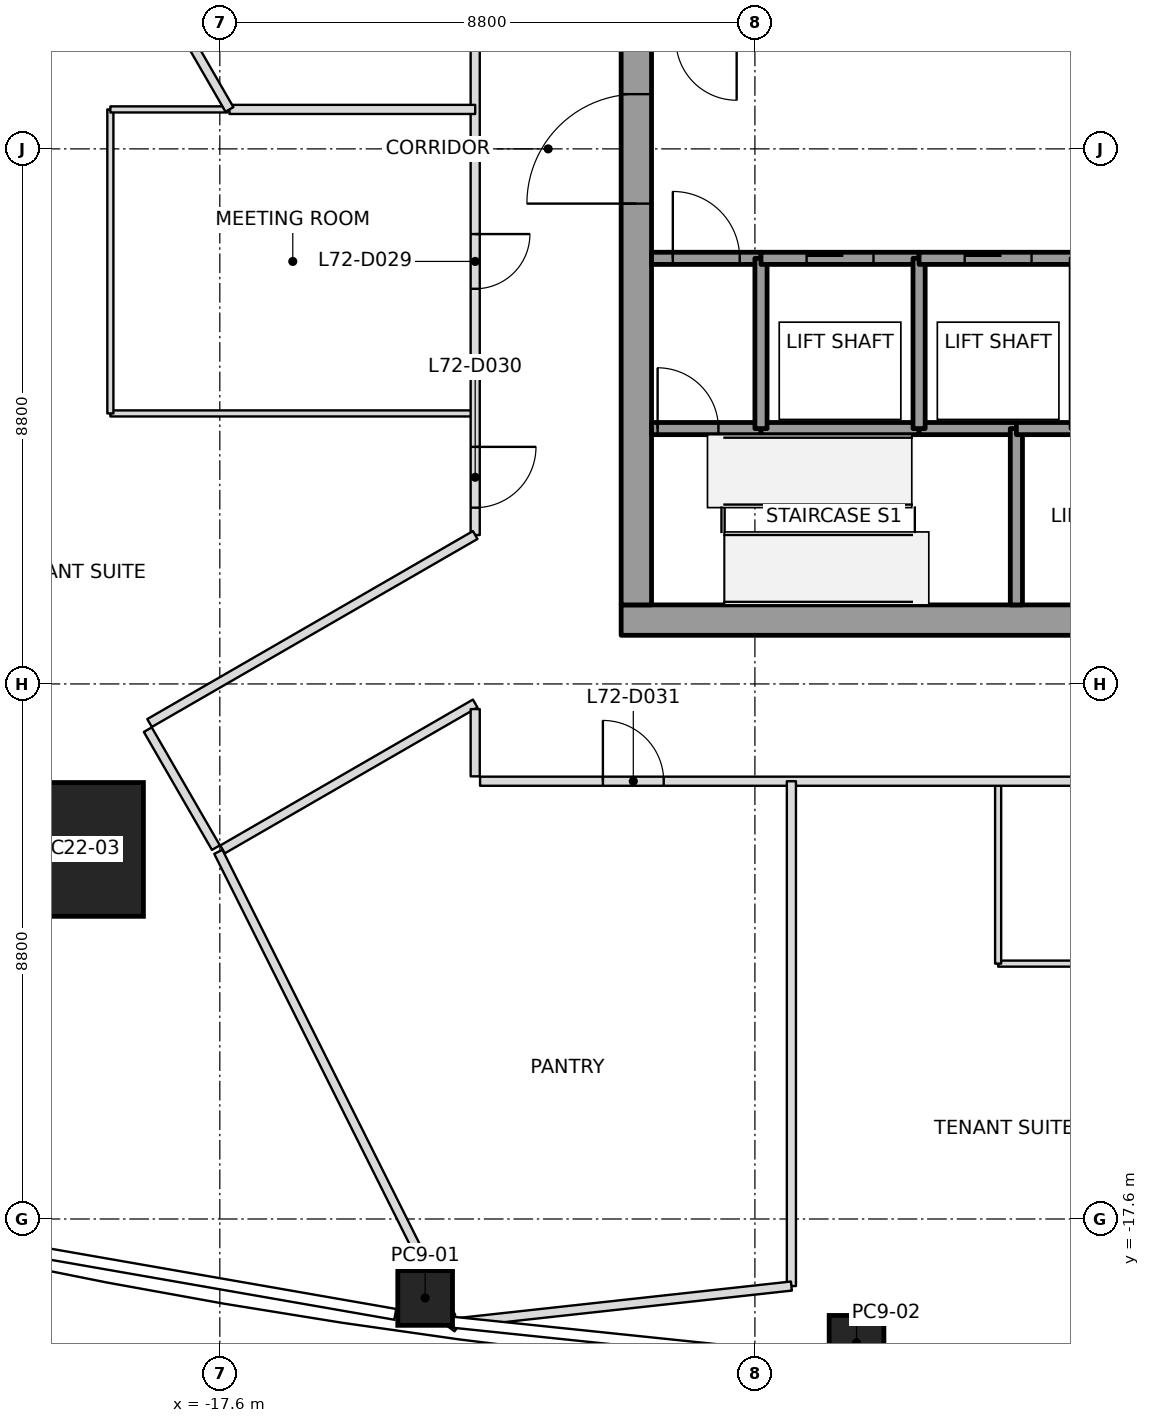
"""IFC4 building model, lengths in metres.
Left out: names, types, materials, properties, quantities, classifications, styles, units other than length and angle.
Written with IfcOpenShell. Run it as: python <this file> out.ifc"""

import sys

from ifc_helpers import new_model, si_unit, direction, frame, frame_2d, origin, origin_2d, place, context, subcontext, project, spatial, rectangle, extrude, clip, halfspace, element, fill, save


model = new_model("IFC4")
c1 = context("Model", 3, precision=1e-05, world=origin(), true_north=direction((0.0, 1.0)))
c2 = subcontext(c1, "Body", "Model", "MODEL_VIEW")
j1 = project(units=[si_unit("LENGTHUNIT", "METRE"), si_unit("PLANEANGLEUNIT", "RADIAN")], contexts=[c1])
p1 = place(None, origin())
s1 = spatial("IfcSite", under=j1, at=p1, CompositionType="ELEMENT")
p2 = place(p1, origin())
s2 = spatial("IfcBuilding", under=s1, at=p2, CompositionType="ELEMENT")
p3 = place(p2, frame((0.0, 0.0, 315.0)))
s3 = spatial("IfcBuildingStorey", under=s2, at=p3, CompositionType="ELEMENT", Elevation=315.0)
p4 = place(p3, frame((-19.957, -11.522, 0.0), z_axis=(0.027695790401, 0.015983033227, 0.999488612163), x_axis=(0.999616398022, -0.00044283261, -0.027692249912)))
e1 = element("IfcColumn", 1, at=p4, inside=s3, PredefinedType="COLUMN", context=c2, shape_type="SweptSolid", body=[
    clip(extrude(rectangle(XDim=2.2, YDim=2.2, at=origin_2d()), origin(), (0.0, 0.0, 1.0), 4.002), halfspace(frame((0.0, 0.0, 3.996)), False)),
])
p5 = place(p3, frame((-14.223, -18.899, 0.0), z_axis=(0.017391463473, 0.010312832726, 0.999795570344), x_axis=(-0.990322442734, 0.13788284729, 0.015804424743)))
e2 = element("IfcColumn", 2, at=p5, inside=s3, PredefinedType="COLUMN", context=c2, shape_type="SweptSolid", body=[
    clip(extrude(rectangle(XDim=0.9, YDim=0.9, at=origin_2d()), origin(), (0.0, 0.0, 1.0), 4.001), halfspace(frame((0.0, 0.0, 3.999)), False)),
])
p6 = place(p3, frame((-7.129, -19.637, 0.0), z_axis=(0.008727144629, 0.01122933295, 0.9998988644), x_axis=(-0.997577286368, 0.069113396853, 0.007930705989)))
e3 = element("IfcColumn", 3, at=p6, inside=s3, PredefinedType="COLUMN", context=c2, shape_type="SweptSolid", body=[
    clip(extrude(rectangle(XDim=0.9, YDim=0.9, at=origin_2d()), origin(), (0.0, 0.0, 1.0), 4.0), halfspace(frame((0.0, 0.0, 3.999)), False)),
])
p7 = place(p3, frame((-11.0, -7.75, 0.0), z_axis=(0.0, 0.0, 1.0), x_axis=(1.0, 0.0, 0.0)))
e4 = element("IfcWall", 4, at=p7, inside=s3, PredefinedType="SHEAR", context=c2, shape_type="SweptSolid", body=[
    extrude(rectangle(XDim=22.0, YDim=0.5, at=frame_2d((11.0, 0.0))), origin(), (0.0, 0.0, 1.0), 4.0),
])
p8 = place(p7, frame((10.45, 0.0, 0.0)))
e5 = element("IfcOpeningElement", 5, at=p8, cuts=e4, PredefinedType="OPENING", context=c2, shape_type="SweptSolid", body=[
    extrude(rectangle(XDim=1.1, YDim=2.1, at=frame_2d((0.55, 1.05))), frame((0.0, 0.25, 0.0), z_axis=(0.0, -1.0, 0.0), x_axis=(1.0, 0.0, 0.0)), (0.0, 0.0, 1.0), 0.5),
])
p9 = place(p3, frame((-10.75, -7.5, 0.0), z_axis=(0.0, 0.0, 1.0), x_axis=(0.0, 1.0, 0.0)))
e6 = element("IfcWall", 6, at=p9, inside=s3, PredefinedType="SHEAR", context=c2, shape_type="SweptSolid", body=[
    extrude(rectangle(XDim=15.0, YDim=0.5, at=frame_2d((7.5, 0.0))), origin(), (0.0, 0.0, 1.0), 4.0),
])
p10 = place(p9, frame((6.6, 0.0, 0.0)))
e7 = element("IfcOpeningElement", 7, at=p10, cuts=e6, PredefinedType="OPENING", context=c2, shape_type="SweptSolid", body=[
    extrude(rectangle(XDim=1.8, YDim=2.1, at=frame_2d((0.9, 1.05))), frame((0.0, 0.25, 0.0), z_axis=(0.0, -1.0, 0.0), x_axis=(1.0, 0.0, 0.0)), (0.0, 0.0, 1.0), 0.5),
])
p11 = place(p3, frame((-10.5, -4.6, 0.0), z_axis=(0.0, 0.0, 1.0), x_axis=(1.0, 0.0, 0.0)))
e8 = element("IfcWall", 8, at=p11, inside=s3, PredefinedType="SOLIDWALL", context=c2, shape_type="SweptSolid", body=[
    extrude(rectangle(XDim=1.8, YDim=0.2, at=frame_2d((0.9, 0.0))), origin(), (0.0, 0.0, 1.0), 3.85),
])
p12 = place(p11, frame((0.1, 0.0, 0.0)))
e9 = element("IfcOpeningElement", 9, at=p12, cuts=e8, PredefinedType="OPENING", context=c2, shape_type="SweptSolid", body=[
    extrude(rectangle(XDim=1.0, YDim=2.1, at=frame_2d((0.5, 1.05))), frame((0.0, 0.1, 0.0), z_axis=(0.0, -1.0, 0.0), x_axis=(1.0, 0.0, 0.0)), (0.0, 0.0, 1.0), 0.2),
])
p13 = place(p3, frame((-10.5, -1.8, 0.0), z_axis=(0.0, 0.0, 1.0), x_axis=(1.0, 0.0, 0.0)))
e10 = element("IfcWall", 10, at=p13, inside=s3, PredefinedType="SOLIDWALL", context=c2, shape_type="SweptSolid", body=[
    extrude(rectangle(XDim=1.8, YDim=0.2, at=frame_2d((0.9, 0.0))), origin(), (0.0, 0.0, 1.0), 3.85),
])
p14 = place(p13, frame((0.35, 0.0, 0.0)))
e11 = element("IfcOpeningElement", 11, at=p14, cuts=e10, PredefinedType="OPENING", context=c2, shape_type="SweptSolid", body=[
    extrude(rectangle(XDim=1.1, YDim=2.1, at=frame_2d((0.55, 1.05))), frame((0.0, 0.1, 0.0), z_axis=(0.0, -1.0, 0.0), x_axis=(1.0, 0.0, 0.0)), (0.0, 0.0, 1.0), 0.2),
])
p15 = place(p3, frame((-8.7, -4.6, 0.0), z_axis=(0.0, 0.0, 1.0), x_axis=(1.0, 0.0, 0.0)))
e12 = element("IfcWall", 12, at=p15, inside=s3, PredefinedType="SOLIDWALL", context=c2, shape_type="SweptSolid", body=[
    extrude(rectangle(XDim=2.6, YDim=0.2, at=frame_2d((1.3, 0.0))), origin(), (0.0, 0.0, 1.0), 3.85),
])
p16 = place(p3, frame((-8.7, -4.6, 0.0), z_axis=(0.0, 0.0, 1.0), x_axis=(0.0, 1.0, 0.0)))
e13 = element("IfcWall", 13, at=p16, inside=s3, PredefinedType="SOLIDWALL", context=c2, shape_type="SweptSolid", body=[
    extrude(rectangle(XDim=2.8, YDim=0.2, at=frame_2d((1.4, 0.0))), origin(), (0.0, 0.0, 1.0), 3.85),
])
p17 = place(p3, frame((-8.7, -1.8, 0.0), z_axis=(0.0, 0.0, 1.0), x_axis=(1.0, 0.0, 0.0)))
e14 = element("IfcWall", 14, at=p17, inside=s3, PredefinedType="SOLIDWALL", context=c2, shape_type="SweptSolid", body=[
    extrude(rectangle(XDim=2.6, YDim=0.2, at=frame_2d((1.3, 0.0))), origin(), (0.0, 0.0, 1.0), 3.85),
])
p18 = place(p17, frame((0.75, 0.0, 0.0)))
e15 = element("IfcOpeningElement", 15, at=p18, cuts=e14, PredefinedType="OPENING", context=c2, shape_type="SweptSolid", body=[
    extrude(rectangle(XDim=1.1, YDim=2.1, at=frame_2d((0.55, 1.05))), frame((0.0, 0.1, 0.0), z_axis=(0.0, -1.0, 0.0), x_axis=(1.0, 0.0, 0.0)), (0.0, 0.0, 1.0), 0.2),
])
p19 = place(p3, frame((-6.1, -4.6, 0.0), z_axis=(0.0, 0.0, 1.0), x_axis=(1.0, 0.0, 0.0)))
e16 = element("IfcWall", 16, at=p19, inside=s3, PredefinedType="SOLIDWALL", context=c2, shape_type="SweptSolid", body=[
    extrude(rectangle(XDim=1.6, YDim=0.2, at=frame_2d((0.8, 0.0))), origin(), (0.0, 0.0, 1.0), 3.85),
])
p20 = place(p3, frame((-6.1, -4.6, 0.0), z_axis=(0.0, 0.0, 1.0), x_axis=(0.0, 1.0, 0.0)))
e17 = element("IfcWall", 17, at=p20, inside=s3, PredefinedType="SOLIDWALL", context=c2, shape_type="SweptSolid", body=[
    extrude(rectangle(XDim=2.8, YDim=0.2, at=frame_2d((1.4, 0.0))), origin(), (0.0, 0.0, 1.0), 3.85),
])
p21 = place(p3, frame((-6.1, -1.8, 0.0), z_axis=(0.0, 0.0, 1.0), x_axis=(1.0, 0.0, 0.0)))
e18 = element("IfcWall", 18, at=p21, inside=s3, PredefinedType="SOLIDWALL", context=c2, shape_type="SweptSolid", body=[
    extrude(rectangle(XDim=2.6, YDim=0.2, at=frame_2d((1.3, 0.0))), origin(), (0.0, 0.0, 1.0), 3.85),
])
p22 = place(p21, frame((0.75, 0.0, 0.0)))
e19 = element("IfcOpeningElement", 19, at=p22, cuts=e18, PredefinedType="OPENING", context=c2, shape_type="SweptSolid", body=[
    extrude(rectangle(XDim=1.1, YDim=2.1, at=frame_2d((0.55, 1.05))), frame((0.0, 0.1, 0.0), z_axis=(0.0, -1.0, 0.0), x_axis=(1.0, 0.0, 0.0)), (0.0, 0.0, 1.0), 0.2),
])
p23 = place(p3, frame((-4.5, -4.6, 0.0), z_axis=(0.0, 0.0, 1.0), x_axis=(0.0, -1.0, 0.0)))
e20 = element("IfcWall", 20, at=p23, inside=s3, PredefinedType="SOLIDWALL", context=c2, shape_type="SweptSolid", body=[
    extrude(rectangle(XDim=2.9, YDim=0.2, at=frame_2d((1.45, 0.0))), origin(), (0.0, 0.0, 1.0), 3.85),
])
p24 = place(p3, frame((-4.5, -4.6, 0.0), z_axis=(0.0, 0.0, 1.0), x_axis=(1.0, 0.0, 0.0)))
e21 = element("IfcWall", 21, at=p24, inside=s3, PredefinedType="SOLIDWALL", context=c2, shape_type="SweptSolid", body=[
    extrude(rectangle(XDim=1.0, YDim=0.2, at=frame_2d((0.5, 0.0))), origin(), (0.0, 0.0, 1.0), 3.85),
])
p25 = place(p3, frame((-13.4, 0.649, 0.0), z_axis=(0.0, 0.0, 1.0), x_axis=(-1.0, 0.0, 0.0)))
e22 = element("IfcWall", 22, at=p25, inside=s3, PredefinedType="PARTITIONING", context=c2, shape_type="SweptSolid", body=[
    extrude(rectangle(XDim=4.042, YDim=0.15, at=frame_2d((2.021, 0.0))), origin(), (0.0, 0.0, 1.0), 3.45),
])
p26 = place(p3, frame((-17.441, 0.649, 0.0), z_axis=(0.0, 0.0, 1.0), x_axis=(-0.499998843543, 0.866026071464, 0.0)))
e23 = element("IfcWall", 23, at=p26, inside=s3, PredefinedType="PARTITIONING", context=c2, shape_type="SweptSolid", body=[
    extrude(rectangle(XDim=5.531, YDim=0.15, at=frame_2d((2.765, 0.0))), origin(), (0.0, 0.0, 1.0), 3.234),
])
p27 = place(p3, frame((-17.625, -11.561, 0.0), z_axis=(0.0, 0.0, 1.0), x_axis=(0.447464657965, -0.894301615716, 0.0)))
e24 = element("IfcWall", 24, at=p27, inside=s3, PredefinedType="PARTITIONING", context=c2, shape_type="SweptSolid", body=[
    extrude(rectangle(XDim=8.557, YDim=0.15, at=frame_2d((4.278, 0.0))), origin(), (0.0, 0.0, 1.0), 3.45),
])
p28 = place(p3, frame((-8.2, -10.4, 0.0), z_axis=(0.0, 0.0, 1.0), x_axis=(0.0, -1.0, 0.0)))
e25 = element("IfcWall", 25, at=p28, inside=s3, PredefinedType="PARTITIONING", context=c2, shape_type="SweptSolid", body=[
    extrude(rectangle(XDim=8.303, YDim=0.15, at=frame_2d((4.151, 0.0))), origin(), (0.0, 0.0, 1.0), 3.45),
])
p29 = place(p3, frame((-8.2, -18.703, 0.0), z_axis=(0.0, 0.0, 1.0), x_axis=(-0.994036039738, -0.109052059594, 0.0)))
e26 = element("IfcWall", 26, at=p29, inside=s3, PredefinedType="PARTITIONING", context=c2, shape_type="SweptSolid", body=[
    extrude(rectangle(XDim=5.478, YDim=0.15, at=frame_2d((2.739, 0.0))), origin(), (0.0, 0.0, 1.0), 3.234),
])
p30 = place(p3, frame((-13.696, -19.387, 0.0), z_axis=(0.0, 0.0, 1.0), x_axis=(-0.806193122495, 0.591652473368, 0.0)))
e27 = element("IfcWall", 27, at=p30, inside=s3, PredefinedType="PARTITIONING", context=c2, shape_type="SweptSolid", body=[
    extrude(rectangle(XDim=0.183, YDim=0.15, at=frame_2d((0.092, 0.0))), origin(), (0.0, 0.0, 1.0), 3.45),
])
p31 = place(p3, frame((-18.784, -9.552, 0.0), z_axis=(0.0, 0.0, 1.0), x_axis=(0.49994888933, -0.866054910533, 0.0)))
e28 = element("IfcWall", 28, at=p31, inside=s3, PredefinedType="PARTITIONING", context=c2, shape_type="SweptSolid", body=[
    extrude(rectangle(XDim=2.24, YDim=0.15, at=frame_2d((1.12, 0.0))), origin(), (0.0, 0.0, 1.0), 3.233),
])
p32 = place(p3, frame((-13.4, 6.351, 0.0), z_axis=(0.0, 0.0, 1.0), x_axis=(0.0, -1.0, 0.0)))
e29 = element("IfcWall", 29, at=p32, inside=s3, PredefinedType="PARTITIONING", context=c2, shape_type="SweptSolid", body=[
    extrude(rectangle(XDim=12.702, YDim=0.15, at=frame_2d((6.351, 0.0))), origin(), (0.0, 0.0, 1.0), 3.317),
])
p33 = place(p32, frame((2.351, 0.0, 0.0)))
e30 = element("IfcOpeningElement", 30, at=p33, cuts=e29, PredefinedType="OPENING", context=c2, shape_type="SweptSolid", body=[
    extrude(rectangle(XDim=1.0, YDim=2.1, at=frame_2d((0.5, 1.05))), frame((0.0, 0.075, 0.0), z_axis=(0.0, -1.0, 0.0), x_axis=(1.0, 0.0, 0.0)), (0.0, 0.0, 1.0), 0.15),
])
p34 = place(p32, frame((7.752, 0.0, 0.0)))
e31 = element("IfcOpeningElement", 31, at=p34, cuts=e29, PredefinedType="OPENING", context=c2, shape_type="SweptSolid", body=[
    extrude(rectangle(XDim=0.9, YDim=2.1, at=frame_2d((0.45, 1.05))), frame((0.0, 0.075, 0.0), z_axis=(0.0, -1.0, 0.0), x_axis=(1.0, 0.0, 0.0)), (0.0, 0.0, 1.0), 0.15),
])
p35 = place(p32, frame((11.252, 0.0, 0.0)))
e32 = element("IfcOpeningElement", 32, at=p35, cuts=e29, PredefinedType="OPENING", context=c2, shape_type="SweptSolid", body=[
    extrude(rectangle(XDim=1.0, YDim=2.1, at=frame_2d((0.5, 1.05))), frame((0.0, 0.075, 0.0), z_axis=(0.0, -1.0, 0.0), x_axis=(1.0, 0.0, 0.0)), (0.0, 0.0, 1.0), 0.15),
])
p36 = place(p3, frame((-13.4, -6.351, 0.0), z_axis=(0.0, 0.0, 1.0), x_axis=(-0.866038319186, -0.499977629202, 0.0)))
e33 = element("IfcWall", 33, at=p36, inside=s3, PredefinedType="PARTITIONING", context=c2, shape_type="SweptSolid", body=[
    extrude(rectangle(XDim=6.184, YDim=0.15, at=frame_2d((3.092, 0.0))), origin(), (0.0, 0.0, 1.0), 3.317),
])
p37 = place(p3, frame((-17.555, -11.521, 0.0), z_axis=(0.0, 0.0, 1.0), x_axis=(0.866027142779, 0.499996987961, 0.0)))
e34 = element("IfcWall", 34, at=p37, inside=s3, PredefinedType="PARTITIONING", context=c2, shape_type="SweptSolid", body=[
    extrude(rectangle(XDim=4.798, YDim=0.15, at=frame_2d((2.399, 0.0))), origin(), (0.0, 0.0, 1.0), 3.233),
])
p38 = place(p3, frame((-13.4, -9.214, 0.0), z_axis=(0.0, 0.0, 1.0), x_axis=(0.0, -1.0, 0.0)))
e35 = element("IfcWall", 35, at=p38, inside=s3, PredefinedType="PARTITIONING", context=c2, shape_type="SweptSolid", body=[
    extrude(rectangle(XDim=1.106, YDim=0.15, at=frame_2d((0.553, 0.0))), origin(), (0.0, 0.0, 1.0), 3.233),
])
p39 = place(p3, frame((-13.32, -10.4, 0.0), z_axis=(0.0, 0.0, 1.0), x_axis=(1.0, 0.0, 0.0)))
e36 = element("IfcWall", 36, at=p39, inside=s3, PredefinedType="PARTITIONING", context=c2, shape_type="SweptSolid", body=[
    extrude(rectangle(XDim=12.12, YDim=0.15, at=frame_2d((6.06, 0.0))), origin(), (0.0, 0.0, 1.0), 3.393),
])
p40 = place(p39, frame((2.02, 0.0, 0.0)))
e37 = element("IfcOpeningElement", 37, at=p40, cuts=e36, PredefinedType="OPENING", context=c2, shape_type="SweptSolid", body=[
    extrude(rectangle(XDim=1.0, YDim=2.1, at=frame_2d((0.5, 1.05))), frame((0.0, 0.075, 0.0), z_axis=(0.0, -1.0, 0.0), x_axis=(1.0, 0.0, 0.0)), (0.0, 0.0, 1.0), 0.15),
])
p41 = place(p3, frame((-13.43, -4.351, 0.0), z_axis=(0.0, 0.0, 1.0), x_axis=(-1.0, 0.0, 0.0)))
e38 = element("IfcWall", 38, at=p41, inside=s3, PredefinedType="PARTITIONING", context=c2, shape_type="SweptSolid", body=[
    extrude(rectangle(XDim=5.97, YDim=0.1, at=frame_2d((2.985, 0.0))), origin(), (0.0, 0.0, 1.0), 3.317),
])
p42 = place(p3, frame((-19.4, -4.351, 0.0), z_axis=(0.0, 0.0, 1.0), x_axis=(0.0, 1.0, 0.0)))
e39 = element("IfcWall", 39, at=p42, inside=s3, PredefinedType="PARTITIONING", context=c2, shape_type="SweptSolid", body=[
    extrude(rectangle(XDim=5.0, YDim=0.1, at=frame_2d((2.5, 0.0))), origin(), (0.0, 0.0, 1.0), 3.317),
])
p43 = place(p3, frame((-19.4, 0.649, 0.0), z_axis=(0.0, 0.0, 1.0), x_axis=(1.0, 0.0, 0.0)))
e40 = element("IfcWall", 40, at=p43, inside=s3, PredefinedType="PARTITIONING", context=c2, shape_type="SweptSolid", body=[
    extrude(rectangle(XDim=1.924, YDim=0.1, at=frame_2d((0.962, 0.0))), origin(), (0.0, 0.0, 1.0), 3.393),
])
p44 = place(p3, frame((-1.23, -13.4, 0.0), z_axis=(0.0, 0.0, 1.0), x_axis=(-1.0, 0.0, 0.0)))
e41 = element("IfcWall", 41, at=p44, inside=s3, PredefinedType="PARTITIONING", context=c2, shape_type="SweptSolid", body=[
    extrude(rectangle(XDim=3.57, YDim=0.1, at=frame_2d((1.785, 0.0))), origin(), (0.0, 0.0, 1.0), 3.393),
])
p45 = place(p3, frame((-4.8, -13.4, 0.0), z_axis=(0.0, 0.0, 1.0), x_axis=(0.0, 1.0, 0.0)))
e42 = element("IfcWall", 42, at=p45, inside=s3, PredefinedType="PARTITIONING", context=c2, shape_type="SweptSolid", body=[
    extrude(rectangle(XDim=2.97, YDim=0.1, at=frame_2d((1.485, 0.0))), origin(), (0.0, 0.0, 1.0), 3.45),
])
p46 = place(p34, origin())
e43 = element("IfcDoor", 43, at=p46, inside=s3, OperationType="SINGLE_SWING_RIGHT", PredefinedType="DOOR", context=c2, shape_type="SweptSolid", body=[
    extrude(rectangle(XDim=0.9, YDim=2.1, at=frame_2d((0.45, 1.05))), frame((0.0, 0.025, 0.0), z_axis=(0.0, -1.0, 0.0), x_axis=(1.0, 0.0, 0.0)), (0.0, 0.0, 1.0), 0.05),
])
fill(e31, e43)
p47 = place(p35, origin())
e44 = element("IfcDoor", 44, at=p47, inside=s3, OperationType="SINGLE_SWING_RIGHT", PredefinedType="DOOR", context=c2, shape_type="SweptSolid", body=[
    extrude(rectangle(XDim=1.0, YDim=2.1, at=frame_2d((0.5, 1.05))), frame((0.0, 0.025, 0.0), z_axis=(0.0, -1.0, 0.0), x_axis=(1.0, 0.0, 0.0)), (0.0, 0.0, 1.0), 0.05),
])
fill(e32, e44)
p48 = place(p40, origin())
e45 = element("IfcDoor", 45, at=p48, inside=s3, OperationType="SINGLE_SWING_LEFT", PredefinedType="DOOR", context=c2, shape_type="SweptSolid", body=[
    extrude(rectangle(XDim=1.0, YDim=2.1, at=frame_2d((0.5, 1.05))), frame((0.0, 0.025, 0.0), z_axis=(0.0, -1.0, 0.0), x_axis=(1.0, 0.0, 0.0)), (0.0, 0.0, 1.0), 0.05),
])
fill(e37, e45)
p49 = place(p18, origin())
e46 = element("IfcDoor", 46, at=p49, inside=s3, OperationType="SLIDING_TO_RIGHT", PredefinedType="DOOR", context=c2, shape_type="SweptSolid", body=[
    extrude(rectangle(XDim=1.1, YDim=2.1, at=frame_2d((0.55, 1.05))), frame((0.0, 0.025, 0.0), z_axis=(0.0, -1.0, 0.0), x_axis=(1.0, 0.0, 0.0)), (0.0, 0.0, 1.0), 0.05),
])
fill(e15, e46)
p50 = place(p22, origin())
e47 = element("IfcDoor", 47, at=p50, inside=s3, OperationType="SLIDING_TO_RIGHT", PredefinedType="DOOR", context=c2, shape_type="SweptSolid", body=[
    extrude(rectangle(XDim=1.1, YDim=2.1, at=frame_2d((0.55, 1.05))), frame((0.0, 0.025, 0.0), z_axis=(0.0, -1.0, 0.0), x_axis=(1.0, 0.0, 0.0)), (0.0, 0.0, 1.0), 0.05),
])
fill(e19, e47)
p51 = place(p14, origin())
e48 = element("IfcDoor", 48, at=p51, inside=s3, OperationType="SINGLE_SWING_LEFT", PredefinedType="DOOR", context=c2, shape_type="SweptSolid", body=[
    extrude(rectangle(XDim=1.1, YDim=2.1, at=frame_2d((0.55, 1.05))), frame((0.0, 0.025, 0.0), z_axis=(0.0, -1.0, 0.0), x_axis=(1.0, 0.0, 0.0)), (0.0, 0.0, 1.0), 0.05),
])
fill(e11, e48)
p52 = place(p12, origin())
e49 = element("IfcDoor", 49, at=p52, inside=s3, OperationType="SINGLE_SWING_LEFT", PredefinedType="DOOR", context=c2, shape_type="SweptSolid", body=[
    extrude(rectangle(XDim=1.0, YDim=2.1, at=frame_2d((0.5, 1.05))), frame((0.0, 0.025, 0.0), z_axis=(0.0, -1.0, 0.0), x_axis=(1.0, 0.0, 0.0)), (0.0, 0.0, 1.0), 0.05),
])
fill(e9, e49)
p53 = place(p10, origin())
e50 = element("IfcDoor", 50, at=p53, inside=s3, OperationType="DOUBLE_DOOR_SINGLE_SWING", PredefinedType="DOOR", context=c2, shape_type="SweptSolid", body=[
    extrude(rectangle(XDim=1.8, YDim=2.1, at=frame_2d((0.9, 1.05))), frame((0.0, 0.025, 0.0), z_axis=(0.0, -1.0, 0.0), x_axis=(1.0, 0.0, 0.0)), (0.0, 0.0, 1.0), 0.05),
])
fill(e7, e50)
save(model, sys.argv[1])
